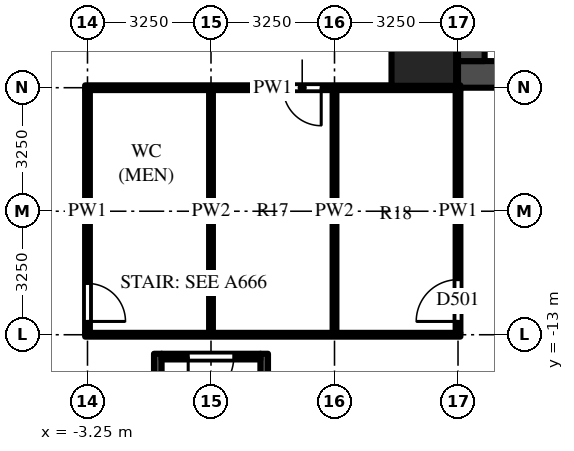
"""IFC4 building model, lengths in metres.
Left out: names, types, materials, properties, quantities, classifications, styles, units other than length and angle.
Written with IfcOpenShell. Run it as: python <this file> out.ifc"""

import sys

from ifc_helpers import new_model, si_unit, direction, frame, frame_2d, origin, origin_2d, place, context, subcontext, project, spatial, rectangle, extrude, source, transform, mapped, element, fill, save


model = new_model("IFC4")
c1 = context("Model", 3, precision=1e-05, world=origin(), true_north=direction((0.0, 1.0)))
c2 = subcontext(c1, "Body", "Model", "MODEL_VIEW")
j1 = project(units=[si_unit("LENGTHUNIT", "METRE"), si_unit("PLANEANGLEUNIT", "RADIAN")], contexts=[c1])
p1 = place(None, origin())
s1 = spatial("IfcSite", under=j1, at=p1, CompositionType="ELEMENT")
p2 = place(p1, origin())
s2 = spatial("IfcBuilding", under=s1, at=p2, CompositionType="ELEMENT")
p3 = place(p2, frame((0.0, 0.0, 8.0)))
s3 = spatial("IfcBuildingStorey", under=s2, at=p3, CompositionType="ELEMENT", Elevation=8.0)
m1 = source(origin(), c2, "Body", "SweptSolid", [
    extrude(rectangle(XDim=1.7, YDim=1.7, at=origin_2d()), origin(), (0.0, 0.0, 1.0), 6.0),
])
p4 = place(p3, frame((5.6, -5.6, 0.0), z_axis=(0.0, 0.0, 1.0), x_axis=(1.0, 0.0, 0.0)))
e1 = element("IfcColumn", 1, at=p4, inside=s3, PredefinedType="COLUMN", context=c2, shape_type="MappedRepresentation", body=[
    mapped(m1, transform((0.0, 0.0, 0.0))),
])
m2 = source(origin(), c2, "Body", "SweptSolid", [
    extrude(rectangle(XDim=16.25, YDim=0.7, at=frame_2d((8.125, 0.0))), origin(), (0.0, 0.0, 1.0), 5.7),
])
p5 = place(p3, frame((6.5, -6.15, 0.0), z_axis=(0.0, 0.0, 1.0), x_axis=(1.0, 0.0, 0.0)))
e2 = element("IfcWall", 2, at=p5, inside=s3, PredefinedType="SHEAR", context=c2, shape_type="MappedRepresentation", body=[
    mapped(m2, transform((0.0, 0.0, 0.0))),
])
m3 = source(origin(), c2, "Body", "SweptSolid", [
    extrude(rectangle(XDim=9.05, YDim=0.7, at=frame_2d((4.525, 0.0))), origin(), (0.0, 0.0, 1.0), 5.7),
])
p6 = place(p3, frame((6.85, -5.8, 0.0), z_axis=(0.0, 0.0, 1.0), x_axis=(0.0, 1.0, 0.0)))
e3 = element("IfcWall", 3, at=p6, inside=s3, PredefinedType="SHEAR", context=c2, shape_type="MappedRepresentation", body=[
    mapped(m3, transform((0.0, 0.0, 0.0))),
])
m4 = source(origin(), c2, "Body", "SweptSolid", [
    extrude(rectangle(XDim=1.8, YDim=2.1, at=frame_2d((0.9, 1.05))), frame((0.0, 0.36, 0.0), z_axis=(0.0, -1.0, 0.0), x_axis=(1.0, 0.0, 0.0)), (0.0, 0.0, 1.0), 0.72),
])
p7 = place(p6, frame((3.15, 0.0, 0.0)))
e4 = element("IfcOpeningElement", 4, at=p7, cuts=e3, PredefinedType="OPENING", context=c2, shape_type="MappedRepresentation", body=[
    mapped(m4, transform((0.0, 0.0, 0.0))),
])
m5 = source(origin(), c2, "Body", "SweptSolid", [
    extrude(rectangle(XDim=6.0, YDim=0.2, at=frame_2d((3.0, 0.0))), origin(), (0.0, 0.0, 1.0), 5.7),
])
for number, where, z_axis, x_axis in (
    (5, (1.4, -13.5, 0.0), (0.0, 0.0, 1.0), (0.0, -1.0, 0.0)),
    (6, (-1.4, -13.5, 0.0), (0.0, 0.0, 1.0), (0.0, -1.0, 0.0)),
):
    element("IfcWall", number, at=place(p3, frame(where, z_axis=z_axis, x_axis=x_axis)), inside=s3, PredefinedType="SHEAR", context=c2, shape_type="MappedRepresentation", body=[
        mapped(m5, transform((0.0, 0.0, 0.0))),
    ])
m6 = source(origin(), c2, "Body", "SweptSolid", [
    extrude(rectangle(XDim=2.6, YDim=0.15, at=frame_2d((1.3, 0.0))), origin(), (0.0, 0.0, 1.0), 5.7),
])
p8 = place(p3, frame((1.3, -13.575, 0.0), z_axis=(0.0, 0.0, 1.0), x_axis=(-1.0, 0.0, 0.0)))
e7 = element("IfcWall", 7, at=p8, inside=s3, PredefinedType="SHEAR", context=c2, shape_type="MappedRepresentation", body=[
    mapped(m6, transform((0.0, 0.0, 0.0))),
])
m7 = source(origin(), c2, "Body", "SweptSolid", [
    extrude(rectangle(XDim=1.2, YDim=2.1, at=frame_2d((0.6, 1.05))), frame((0.0, 0.085, 0.0), z_axis=(0.0, -1.0, 0.0), x_axis=(1.0, 0.0, 0.0)), (0.0, 0.0, 1.0), 0.17),
])
p9 = place(p8, frame((0.7, 0.0, 0.0)))
e8 = element("IfcOpeningElement", 8, at=p9, cuts=e7, PredefinedType="OPENING", context=c2, shape_type="MappedRepresentation", body=[
    mapped(m7, transform((0.0, 0.0, 0.0))),
])
p10 = place(p3, frame((-3.25, -6.562, 0.0), z_axis=(0.0, 0.0, 1.0), x_axis=(0.0, -1.0, 0.0)))
e9 = element("IfcWall", 9, at=p10, inside=s3, PredefinedType="PARTITIONING", context=c2, shape_type="SweptSolid", body=[
    extrude(rectangle(XDim=6.387, YDim=0.125, at=frame_2d((3.194, 0.0))), origin(), (0.0, 0.0, 1.0), 5.7),
])
m8 = source(origin(), c2, "Body", "SweptSolid", [
    extrude(rectangle(XDim=1.0, YDim=2.1, at=frame_2d((0.5, 1.05))), frame((0.0, 0.073, 0.0), z_axis=(0.0, -1.0, 0.0), x_axis=(1.0, 0.0, 0.0)), (0.0, 0.0, 1.0), 0.145),
])
p11 = place(p10, frame((5.087, 0.0, 0.0)))
e10 = element("IfcOpeningElement", 10, at=p11, cuts=e9, PredefinedType="OPENING", context=c2, shape_type="MappedRepresentation", body=[
    mapped(m8, transform((0.0, 0.0, 0.0))),
])
p12 = place(p3, frame((0.0, -12.95, 0.0), z_axis=(0.0, 0.0, 1.0), x_axis=(0.0, 1.0, 0.0)))
e11 = element("IfcWall", 11, at=p12, inside=s3, PredefinedType="PARTITIONING", context=c2, shape_type="SweptSolid", body=[
    extrude(rectangle(XDim=6.387, YDim=0.1, at=frame_2d((3.194, 0.0))), origin(), (0.0, 0.0, 1.0), 5.077),
])
p13 = place(p3, frame((3.25, -12.95, 0.0), z_axis=(0.0, 0.0, 1.0), x_axis=(0.0, 1.0, 0.0)))
e12 = element("IfcWall", 12, at=p13, inside=s3, PredefinedType="PARTITIONING", context=c2, shape_type="SweptSolid", body=[
    extrude(rectangle(XDim=6.387, YDim=0.1, at=frame_2d((3.194, 0.0))), origin(), (0.0, 0.0, 1.0), 5.7),
])
p14 = place(p3, frame((6.5, -12.95, 0.0), z_axis=(0.0, 0.0, 1.0), x_axis=(0.0, 1.0, 0.0)))
e13 = element("IfcWall", 13, at=p14, inside=s3, PredefinedType="PARTITIONING", context=c2, shape_type="SweptSolid", body=[
    extrude(rectangle(XDim=6.387, YDim=0.125, at=frame_2d((3.194, 0.0))), origin(), (0.0, 0.0, 1.0), 4.997),
])
m9 = source(origin(), c2, "Body", "SweptSolid", [
    extrude(rectangle(XDim=1.1, YDim=2.1, at=frame_2d((0.55, 1.05))), frame((0.0, 0.073, 0.0), z_axis=(0.0, -1.0, 0.0), x_axis=(1.0, 0.0, 0.0)), (0.0, 0.0, 1.0), 0.145),
])
p15 = place(p14, frame((0.3, 0.0, 0.0)))
e14 = element("IfcOpeningElement", 14, at=p15, cuts=e13, PredefinedType="OPENING", context=c2, shape_type="MappedRepresentation", body=[
    mapped(m9, transform((0.0, 0.0, 0.0))),
])
p16 = place(p3, frame((-3.312, -13.0, 0.0), z_axis=(0.0, 0.0, 1.0), x_axis=(1.0, 0.0, 0.0)))
e15 = element("IfcWall", 15, at=p16, inside=s3, PredefinedType="PARTITIONING", context=c2, shape_type="SweptSolid", body=[
    extrude(rectangle(XDim=9.875, YDim=0.1, at=frame_2d((4.938, 0.0))), origin(), (0.0, 0.0, 1.0), 4.762),
])
p17 = place(p3, frame((6.562, -6.5, 0.0), z_axis=(0.0, 0.0, 1.0), x_axis=(-1.0, 0.0, 0.0)))
e16 = element("IfcWall", 16, at=p17, inside=s3, PredefinedType="PARTITIONING", context=c2, shape_type="SweptSolid", body=[
    extrude(rectangle(XDim=9.875, YDim=0.125, at=frame_2d((4.938, 0.0))), origin(), (0.0, 0.0, 1.0), 4.762),
])
p18 = place(p17, frame((3.663, 0.0, 0.0)))
e17 = element("IfcOpeningElement", 17, at=p18, cuts=e16, PredefinedType="OPENING", context=c2, shape_type="MappedRepresentation", body=[
    mapped(m8, transform((0.0, 0.0, 0.0))),
])
m10 = source(origin(), c2, "Body", "SweptSolid", [
    extrude(rectangle(XDim=1.2, YDim=2.1, at=frame_2d((0.6, 1.05))), frame((0.0, 0.025, 0.0), z_axis=(0.0, -1.0, 0.0), x_axis=(1.0, 0.0, 0.0)), (0.0, 0.0, 1.0), 0.05),
])
p19 = place(p9, origin())
e18 = element("IfcDoor", 18, at=p19, inside=s3, OperationType="SINGLE_SWING_RIGHT", PredefinedType="DOOR", context=c2, shape_type="MappedRepresentation", body=[
    mapped(m10, transform((0.0, 0.0, 0.0))),
])
fill(e8, e18)
m11 = source(origin(), c2, "Body", "SweptSolid", [
    extrude(rectangle(XDim=1.0, YDim=2.1, at=frame_2d((0.5, 1.05))), frame((0.0, 0.025, 0.0), z_axis=(0.0, -1.0, 0.0), x_axis=(1.0, 0.0, 0.0)), (0.0, 0.0, 1.0), 0.05),
])
p20 = place(p11, origin())
e19 = element("IfcDoor", 19, at=p20, inside=s3, OperationType="SINGLE_SWING_RIGHT", PredefinedType="DOOR", context=c2, shape_type="MappedRepresentation", body=[
    mapped(m11, transform((0.0, 0.0, 0.0))),
])
fill(e10, e19)
m12 = source(origin(), c2, "Body", "SweptSolid", [
    extrude(rectangle(XDim=1.1, YDim=2.1, at=frame_2d((0.55, 1.05))), frame((0.0, 0.025, 0.0), z_axis=(0.0, -1.0, 0.0), x_axis=(1.0, 0.0, 0.0)), (0.0, 0.0, 1.0), 0.05),
])
p21 = place(p15, origin())
e20 = element("IfcDoor", 20, at=p21, inside=s3, OperationType="SINGLE_SWING_LEFT", PredefinedType="DOOR", context=c2, shape_type="MappedRepresentation", body=[
    mapped(m12, transform((0.0, 0.0, 0.0))),
])
fill(e14, e20)
p22 = place(p18, origin())
e21 = element("IfcDoor", 21, at=p22, inside=s3, OperationType="SINGLE_SWING_LEFT", PredefinedType="DOOR", context=c2, shape_type="MappedRepresentation", body=[
    mapped(m11, transform((0.0, 0.0, 0.0))),
])
fill(e17, e21)
save(model, sys.argv[1])
